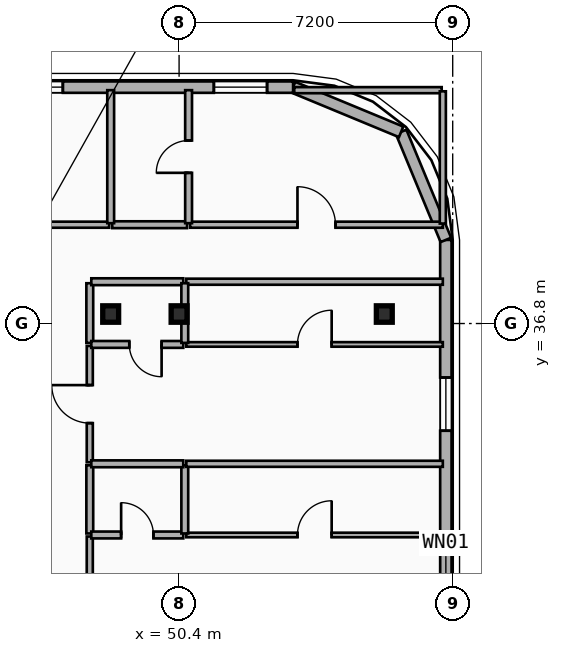
"""IFC4 building model, lengths in metres.
Left out: names, types, materials, properties, quantities, classifications, styles, units other than length and angle.
Written with IfcOpenShell. Run it as: python <this file> out.ifc"""

import sys

from ifc_helpers import new_model, si_unit, direction, frame, frame_2d, origin, origin_2d, place, context, subcontext, project, spatial, rectangle, i_section, extrude, element, fill, save


model = new_model("IFC4")
c1 = context("Model", 3, precision=1e-05, world=origin(), true_north=direction((0.0, 1.0)))
c2 = subcontext(c1, "Body", "Model", "MODEL_VIEW")
j1 = project(units=[si_unit("LENGTHUNIT", "METRE"), si_unit("PLANEANGLEUNIT", "RADIAN")], contexts=[c1])
p1 = place(None, origin())
s1 = spatial("IfcSite", under=j1, at=p1, CompositionType="ELEMENT")
p2 = place(p1, origin())
s2 = spatial("IfcBuilding", under=s1, at=p2, CompositionType="ELEMENT")
p3 = place(p2, frame((0.0, 0.0, 104.8)))
s3 = spatial("IfcBuildingStorey", under=s2, at=p3, CompositionType="ELEMENT", Elevation=104.8)
for number, where, z_axis, x_axis in (
    (1, (48.6, 37.05, 0.0), (0.0, 0.0, 1.0), (1.0, 0.0, 0.0)),
    (2, (50.4, 37.05, 0.0), (0.0, 0.0, 1.0), (1.0, 0.0, 0.0)),
    (3, (55.8, 37.05, 0.0), (0.0, 0.0, 1.0), (1.0, 0.0, 0.0)),
):
    element("IfcColumn", number, at=place(p3, frame(where, z_axis=z_axis, x_axis=x_axis)), inside=s3, PredefinedType="COLUMN", context=c2, shape_type="SweptSolid", body=[
        extrude(i_section(OverallWidth=0.418, OverallDepth=0.432, WebThickness=0.035, FlangeThickness=0.056, FilletRadius=0.015, at=origin_2d()), origin(), (0.0, 0.0, 1.0), 3.5),
    ])
p4 = place(p3, frame((57.42, 39.0, 0.0), z_axis=(0.0, 0.0, 1.0), x_axis=(0.0, -1.0, 0.0)))
e4 = element("IfcWall", 4, at=p4, inside=s3, PredefinedType="SOLIDWALL", context=c2, shape_type="SweptSolid", body=[
    extrude(rectangle(XDim=18.0, YDim=0.3, at=frame_2d((9.0, 0.0))), origin(), (0.0, 0.0, 1.0), 3.24),
])
p5 = place(p4, frame((8.882, 0.0, 0.48)))
e5 = element("IfcOpeningElement", 5, at=p5, cuts=e4, PredefinedType="OPENING", context=c2, shape_type="SweptSolid", body=[
    extrude(rectangle(XDim=1.4, YDim=1.8, at=frame_2d((0.7, 0.9))), frame((0.0, 0.16, 0.0), z_axis=(0.0, -1.0, 0.0), x_axis=(1.0, 0.0, 0.0)), (0.0, 0.0, 1.0), 0.32),
])
p6 = place(p4, frame((3.621, 0.0, 0.48)))
e6 = element("IfcOpeningElement", 6, at=p6, cuts=e4, PredefinedType="OPENING", context=c2, shape_type="SweptSolid", body=[
    extrude(rectangle(XDim=1.4, YDim=1.8, at=frame_2d((0.7, 0.9))), frame((0.0, 0.16, 0.0), z_axis=(0.0, -1.0, 0.0), x_axis=(1.0, 0.0, 0.0)), (0.0, 0.0, 1.0), 0.32),
])
p7 = place(p4, frame((14.655, 0.0, 0.48)))
e7 = element("IfcOpeningElement", 7, at=p7, cuts=e4, PredefinedType="OPENING", context=c2, shape_type="SweptSolid", body=[
    extrude(rectangle(XDim=1.4, YDim=1.8, at=frame_2d((0.7, 0.9))), frame((0.0, 0.16, 0.0), z_axis=(0.0, -1.0, 0.0), x_axis=(1.0, 0.0, 0.0)), (0.0, 0.0, 1.0), 0.32),
])
p8 = place(p3, frame((56.243, 41.843, 0.0), z_axis=(0.0, 0.0, 1.0), x_axis=(0.382636798336, -0.92389884758, 0.0)))
e8 = element("IfcWall", 8, at=p8, inside=s3, PredefinedType="SOLIDWALL", context=c2, shape_type="SweptSolid", body=[
    extrude(rectangle(XDim=3.077, YDim=0.3, at=frame_2d((1.538, 0.0))), origin(), (0.0, 0.0, 1.0), 3.24),
])
p9 = place(p3, frame((53.4, 43.02, 0.0), z_axis=(0.0, 0.0, 1.0), x_axis=(0.923882414032, -0.382676475685, 0.0)))
e9 = element("IfcWall", 9, at=p9, inside=s3, PredefinedType="SOLIDWALL", context=c2, shape_type="SweptSolid", body=[
    extrude(rectangle(XDim=3.077, YDim=0.3, at=frame_2d((1.539, 0.0))), origin(), (0.0, 0.0, 1.0), 3.24),
])
p10 = place(p3, frame((4.2, 43.02, 0.0), z_axis=(0.0, 0.0, 1.0), x_axis=(1.0, 0.0, 0.0)))
e10 = element("IfcWall", 10, at=p10, inside=s3, PredefinedType="SOLIDWALL", context=c2, shape_type="SweptSolid", body=[
    extrude(rectangle(XDim=49.2, YDim=0.3, at=frame_2d((24.6, 0.0))), origin(), (0.0, 0.0, 1.0), 3.24),
])
p11 = place(p10, frame((11.657, 0.0, 0.85)))
e11 = element("IfcOpeningElement", 11, at=p11, cuts=e10, PredefinedType="OPENING", context=c2, shape_type="SweptSolid", body=[
    extrude(rectangle(XDim=1.4, YDim=1.8, at=frame_2d((0.7, 0.9))), frame((0.0, 0.16, 0.0), z_axis=(0.0, -1.0, 0.0), x_axis=(1.0, 0.0, 0.0)), (0.0, 0.0, 1.0), 0.32),
])
p12 = place(p10, frame((20.053, 0.0, 0.85)))
e12 = element("IfcOpeningElement", 12, at=p12, cuts=e10, PredefinedType="OPENING", context=c2, shape_type="SweptSolid", body=[
    extrude(rectangle(XDim=1.4, YDim=1.8, at=frame_2d((0.7, 0.9))), frame((0.0, 0.16, 0.0), z_axis=(0.0, -1.0, 0.0), x_axis=(1.0, 0.0, 0.0)), (0.0, 0.0, 1.0), 0.32),
])
p13 = place(p10, frame((29.789, 0.0, 0.85)))
e13 = element("IfcOpeningElement", 13, at=p13, cuts=e10, PredefinedType="OPENING", context=c2, shape_type="SweptSolid", body=[
    extrude(rectangle(XDim=1.4, YDim=1.8, at=frame_2d((0.7, 0.9))), frame((0.0, 0.16, 0.0), z_axis=(0.0, -1.0, 0.0), x_axis=(1.0, 0.0, 0.0)), (0.0, 0.0, 1.0), 0.32),
])
p14 = place(p10, frame((31.928, 0.0, 0.85)))
e14 = element("IfcOpeningElement", 14, at=p14, cuts=e10, PredefinedType="OPENING", context=c2, shape_type="SweptSolid", body=[
    extrude(rectangle(XDim=1.4, YDim=1.8, at=frame_2d((0.7, 0.9))), frame((0.0, 0.16, 0.0), z_axis=(0.0, -1.0, 0.0), x_axis=(1.0, 0.0, 0.0)), (0.0, 0.0, 1.0), 0.32),
])
p15 = place(p10, frame((39.382, 0.0, 0.85)))
e15 = element("IfcOpeningElement", 15, at=p15, cuts=e10, PredefinedType="OPENING", context=c2, shape_type="SweptSolid", body=[
    extrude(rectangle(XDim=1.4, YDim=1.8, at=frame_2d((0.7, 0.9))), frame((0.0, 0.16, 0.0), z_axis=(0.0, -1.0, 0.0), x_axis=(1.0, 0.0, 0.0)), (0.0, 0.0, 1.0), 0.32),
])
p16 = place(p10, frame((41.741, 0.0, 0.85)))
e16 = element("IfcOpeningElement", 16, at=p16, cuts=e10, PredefinedType="OPENING", context=c2, shape_type="SweptSolid", body=[
    extrude(rectangle(XDim=1.4, YDim=1.8, at=frame_2d((0.7, 0.9))), frame((0.0, 0.16, 0.0), z_axis=(0.0, -1.0, 0.0), x_axis=(1.0, 0.0, 0.0)), (0.0, 0.0, 1.0), 0.32),
])
p17 = place(p10, frame((47.115, 0.0, 0.85)))
e17 = element("IfcOpeningElement", 17, at=p17, cuts=e10, PredefinedType="OPENING", context=c2, shape_type="SweptSolid", body=[
    extrude(rectangle(XDim=1.4, YDim=1.8, at=frame_2d((0.7, 0.9))), frame((0.0, 0.16, 0.0), z_axis=(0.0, -1.0, 0.0), x_axis=(1.0, 0.0, 0.0)), (0.0, 0.0, 1.0), 0.32),
])
p18 = place(p3, frame((48.05, 27.64, 0.0), z_axis=(0.0, 0.0, 1.0), x_axis=(0.0, 1.0, 0.0)))
e18 = element("IfcWall", 18, at=p18, inside=s3, PredefinedType="PARTITIONING", context=c2, shape_type="SweptSolid", body=[
    extrude(rectangle(XDim=3.556, YDim=0.16, at=frame_2d((1.778, 0.0))), origin(), (0.0, 0.0, 1.0), 3.24),
])
p19 = place(p18, frame((1.278, 0.0, 0.0)))
e19 = element("IfcOpeningElement", 19, at=p19, cuts=e18, PredefinedType="OPENING", context=c2, shape_type="SweptSolid", body=[
    extrude(rectangle(XDim=1.0, YDim=2.15, at=frame_2d((0.5, 1.075))), frame((0.0, 0.09, 0.0), z_axis=(0.0, -1.0, 0.0), x_axis=(1.0, 0.0, 0.0)), (0.0, 0.0, 1.0), 0.18),
])
p20 = place(p3, frame((48.05, 31.276, 0.0), z_axis=(0.0, 0.0, 1.0), x_axis=(0.0, 1.0, 0.0)))
e20 = element("IfcWall", 20, at=p20, inside=s3, PredefinedType="PLUMBINGWALL", context=c2, shape_type="SweptSolid", body=[
    extrude(rectangle(XDim=1.793, YDim=0.18, at=frame_2d((0.896, 0.0))), origin(), (0.0, 0.0, 1.0), 3.24),
])
p21 = place(p3, frame((48.05, 33.149, 0.0), z_axis=(0.0, 0.0, 1.0), x_axis=(0.0, 1.0, 0.0)))
e21 = element("IfcWall", 21, at=p21, inside=s3, PredefinedType="PARTITIONING", context=c2, shape_type="SweptSolid", body=[
    extrude(rectangle(XDim=3.061, YDim=0.16, at=frame_2d((1.531, 0.0))), origin(), (0.0, 0.0, 1.0), 3.24),
])
p22 = place(p21, frame((1.031, 0.0, 0.0)))
e22 = element("IfcOpeningElement", 22, at=p22, cuts=e21, PredefinedType="OPENING", context=c2, shape_type="SweptSolid", body=[
    extrude(rectangle(XDim=1.0, YDim=2.15, at=frame_2d((0.5, 1.075))), frame((0.0, 0.09, 0.0), z_axis=(0.0, -1.0, 0.0), x_axis=(1.0, 0.0, 0.0)), (0.0, 0.0, 1.0), 0.18),
])
p23 = place(p3, frame((48.05, 36.29, 0.0), z_axis=(0.0, 0.0, 1.0), x_axis=(0.0, 1.0, 0.0)))
e23 = element("IfcWall", 23, at=p23, inside=s3, PredefinedType="PLUMBINGWALL", context=c2, shape_type="SweptSolid", body=[
    extrude(rectangle(XDim=1.57, YDim=0.18, at=frame_2d((0.785, 0.0))), origin(), (0.0, 0.0, 1.0), 2.72),
])
p24 = place(p3, frame((48.09, 37.9, 0.0), z_axis=(0.0, 0.0, 1.0), x_axis=(1.0, 0.0, 0.0)))
e24 = element("IfcWall", 24, at=p24, inside=s3, PredefinedType="PLUMBINGWALL", context=c2, shape_type="SweptSolid", body=[
    extrude(rectangle(XDim=2.42, YDim=0.18, at=frame_2d((1.21, 0.0))), origin(), (0.0, 0.0, 1.0), 3.24),
])
p25 = place(p3, frame((50.59, 37.9, 0.0), z_axis=(0.0, 0.0, 1.0), x_axis=(1.0, 0.0, 0.0)))
e25 = element("IfcWall", 25, at=p25, inside=s3, PredefinedType="PARTITIONING", context=c2, shape_type="SweptSolid", body=[
    extrude(rectangle(XDim=6.75, YDim=0.16, at=frame_2d((3.375, 0.0))), origin(), (0.0, 0.0, 1.0), 3.24),
])
p26 = place(p3, frame((42.363, 39.4, 0.0), z_axis=(0.0, 0.0, 1.0), x_axis=(1.0, 0.0, 0.0)))
e26 = element("IfcWall", 26, at=p26, inside=s3, PredefinedType="PARTITIONING", context=c2, shape_type="SweptSolid", body=[
    extrude(rectangle(XDim=6.197, YDim=0.16, at=frame_2d((3.099, 0.0))), origin(), (0.0, 0.0, 1.0), 3.24),
])
p27 = place(p26, frame((2.598, 0.0, 0.0)))
e27 = element("IfcOpeningElement", 27, at=p27, cuts=e26, PredefinedType="OPENING", context=c2, shape_type="SweptSolid", body=[
    extrude(rectangle(XDim=1.0, YDim=2.15, at=frame_2d((0.5, 1.075))), frame((0.0, 0.09, 0.0), z_axis=(0.0, -1.0, 0.0), x_axis=(1.0, 0.0, 0.0)), (0.0, 0.0, 1.0), 0.18),
])
p28 = place(p3, frame((50.69, 39.4, 0.0), z_axis=(0.0, 0.0, 1.0), x_axis=(1.0, 0.0, 0.0)))
e28 = element("IfcWall", 28, at=p28, inside=s3, PredefinedType="PARTITIONING", context=c2, shape_type="SweptSolid", body=[
    extrude(rectangle(XDim=6.65, YDim=0.16, at=frame_2d((3.325, 0.0))), origin(), (0.0, 0.0, 1.0), 3.24),
])
p29 = place(p28, frame((2.825, 0.0, 0.0)))
e29 = element("IfcOpeningElement", 29, at=p29, cuts=e28, PredefinedType="OPENING", context=c2, shape_type="SweptSolid", body=[
    extrude(rectangle(XDim=1.0, YDim=2.15, at=frame_2d((0.5, 1.075))), frame((0.0, 0.09, 0.0), z_axis=(0.0, -1.0, 0.0), x_axis=(1.0, 0.0, 0.0)), (0.0, 0.0, 1.0), 0.18),
])
p30 = place(p3, frame((48.64, 39.4, 0.0), z_axis=(0.0, 0.0, 1.0), x_axis=(1.0, 0.0, 0.0)))
e30 = element("IfcWall", 30, at=p30, inside=s3, PredefinedType="PLUMBINGWALL", context=c2, shape_type="SweptSolid", body=[
    extrude(rectangle(XDim=1.97, YDim=0.18, at=frame_2d((0.985, 0.0))), origin(), (0.0, 0.0, 1.0), 3.24),
])
p31 = place(p3, frame((48.09, 31.236, 0.0), z_axis=(0.0, 0.0, 1.0), x_axis=(1.0, 0.0, 0.0)))
e31 = element("IfcWall", 31, at=p31, inside=s3, PredefinedType="PLUMBINGWALL", context=c2, shape_type="SweptSolid", body=[
    extrude(rectangle(XDim=2.42, YDim=0.18, at=frame_2d((1.21, 0.0))), origin(), (0.0, 0.0, 1.0), 2.57),
])
p32 = place(p31, frame((0.785, 0.0, 0.0)))
e32 = element("IfcOpeningElement", 32, at=p32, cuts=e31, PredefinedType="OPENING", context=c2, shape_type="SweptSolid", body=[
    extrude(rectangle(XDim=0.85, YDim=2.1, at=frame_2d((0.425, 1.05))), frame((0.0, 0.1, 0.0), z_axis=(0.0, -1.0, 0.0), x_axis=(1.0, 0.0, 0.0)), (0.0, 0.0, 1.0), 0.2),
])
p33 = place(p3, frame((50.59, 31.236, 0.0), z_axis=(0.0, 0.0, 1.0), x_axis=(1.0, 0.0, 0.0)))
e33 = element("IfcWall", 33, at=p33, inside=s3, PredefinedType="PARTITIONING", context=c2, shape_type="SweptSolid", body=[
    extrude(rectangle(XDim=6.75, YDim=0.12, at=frame_2d((3.375, 0.0))), origin(), (0.0, 0.0, 1.0), 2.57),
])
p34 = place(p33, frame((2.925, 0.0, 0.0)))
e34 = element("IfcOpeningElement", 34, at=p34, cuts=e33, PredefinedType="OPENING", context=c2, shape_type="SweptSolid", body=[
    extrude(rectangle(XDim=0.9, YDim=2.1, at=frame_2d((0.45, 1.05))), frame((0.0, 0.07, 0.0), z_axis=(0.0, -1.0, 0.0), x_axis=(1.0, 0.0, 0.0)), (0.0, 0.0, 1.0), 0.14),
])
p35 = place(p3, frame((50.55, 31.276, 0.0), z_axis=(0.0, 0.0, 1.0), x_axis=(0.0, 1.0, 0.0)))
e35 = element("IfcWall", 35, at=p35, inside=s3, PredefinedType="PLUMBINGWALL", context=c2, shape_type="SweptSolid", body=[
    extrude(rectangle(XDim=1.793, YDim=0.18, at=frame_2d((0.896, 0.0))), origin(), (0.0, 0.0, 1.0), 2.57),
])
p36 = place(p3, frame((48.09, 33.109, 0.0), z_axis=(0.0, 0.0, 1.0), x_axis=(1.0, 0.0, 0.0)))
e36 = element("IfcWall", 36, at=p36, inside=s3, PredefinedType="PLUMBINGWALL", context=c2, shape_type="SweptSolid", body=[
    extrude(rectangle(XDim=2.42, YDim=0.18, at=frame_2d((1.21, 0.0))), origin(), (0.0, 0.0, 1.0), 2.57),
])
p37 = place(p3, frame((50.59, 33.109, 0.0), z_axis=(0.0, 0.0, 1.0), x_axis=(1.0, 0.0, 0.0)))
e37 = element("IfcWall", 37, at=p37, inside=s3, PredefinedType="PARTITIONING", context=c2, shape_type="SweptSolid", body=[
    extrude(rectangle(XDim=6.75, YDim=0.16, at=frame_2d((3.375, 0.0))), origin(), (0.0, 0.0, 1.0), 2.57),
])
p38 = place(p3, frame((50.51, 36.25, 0.0), z_axis=(0.0, 0.0, 1.0), x_axis=(-1.0, 0.0, 0.0)))
e38 = element("IfcWall", 38, at=p38, inside=s3, PredefinedType="PLUMBINGWALL", context=c2, shape_type="SweptSolid", body=[
    extrude(rectangle(XDim=2.42, YDim=0.18, at=frame_2d((1.21, 0.0))), origin(), (0.0, 0.0, 1.0), 2.57),
])
p39 = place(p38, frame((0.57, 0.0, 0.0)))
e39 = element("IfcOpeningElement", 39, at=p39, cuts=e38, PredefinedType="OPENING", context=c2, shape_type="SweptSolid", body=[
    extrude(rectangle(XDim=0.85, YDim=2.1, at=frame_2d((0.425, 1.05))), frame((0.0, 0.1, 0.0), z_axis=(0.0, -1.0, 0.0), x_axis=(1.0, 0.0, 0.0)), (0.0, 0.0, 1.0), 0.2),
])
p40 = place(p3, frame((50.59, 36.25, 0.0), z_axis=(0.0, 0.0, 1.0), x_axis=(1.0, 0.0, 0.0)))
e40 = element("IfcWall", 40, at=p40, inside=s3, PredefinedType="PARTITIONING", context=c2, shape_type="SweptSolid", body=[
    extrude(rectangle(XDim=6.75, YDim=0.12, at=frame_2d((3.375, 0.0))), origin(), (0.0, 0.0, 1.0), 2.57),
])
p41 = place(p40, frame((2.925, 0.0, 0.0)))
e41 = element("IfcOpeningElement", 41, at=p41, cuts=e40, PredefinedType="OPENING", context=c2, shape_type="SweptSolid", body=[
    extrude(rectangle(XDim=0.9, YDim=2.1, at=frame_2d((0.45, 1.05))), frame((0.0, 0.07, 0.0), z_axis=(0.0, -1.0, 0.0), x_axis=(1.0, 0.0, 0.0)), (0.0, 0.0, 1.0), 0.14),
])
p42 = place(p3, frame((50.55, 36.29, 0.0), z_axis=(0.0, 0.0, 1.0), x_axis=(0.0, 1.0, 0.0)))
e42 = element("IfcWall", 42, at=p42, inside=s3, PredefinedType="PLUMBINGWALL", context=c2, shape_type="SweptSolid", body=[
    extrude(rectangle(XDim=1.57, YDim=0.18, at=frame_2d((0.785, 0.0))), origin(), (0.0, 0.0, 1.0), 2.57),
])
p43 = place(p3, frame((48.6, 39.44, 0.0), z_axis=(0.0, 0.0, 1.0), x_axis=(0.0, 1.0, 0.0)))
e43 = element("IfcWall", 43, at=p43, inside=s3, PredefinedType="PLUMBINGWALL", context=c2, shape_type="SweptSolid", body=[
    extrude(rectangle(XDim=3.5, YDim=0.18, at=frame_2d((1.75, 0.0))), origin(), (0.0, 0.0, 1.0), 3.24),
])
p44 = place(p3, frame((50.65, 39.44, 0.0), z_axis=(0.0, 0.0, 1.0), x_axis=(0.0, 1.0, 0.0)))
e44 = element("IfcWall", 44, at=p44, inside=s3, PredefinedType="PLUMBINGWALL", context=c2, shape_type="SweptSolid", body=[
    extrude(rectangle(XDim=3.5, YDim=0.18, at=frame_2d((1.75, 0.0))), origin(), (0.0, 0.0, 1.0), 3.24),
])
p45 = place(p44, frame((1.325, 0.0, 0.0)))
e45 = element("IfcOpeningElement", 45, at=p45, cuts=e44, PredefinedType="OPENING", context=c2, shape_type="SweptSolid", body=[
    extrude(rectangle(XDim=0.85, YDim=2.1, at=frame_2d((0.425, 1.05))), frame((0.0, 0.1, 0.0), z_axis=(0.0, -1.0, 0.0), x_axis=(1.0, 0.0, 0.0)), (0.0, 0.0, 1.0), 0.2),
])
p46 = place(p3, frame((53.43, 42.94, 0.0), z_axis=(0.0, 0.0, 1.0), x_axis=(1.0, 0.0, 0.0)))
e46 = element("IfcWall", 46, at=p46, inside=s3, PredefinedType="PARTITIONING", context=c2, shape_type="SweptSolid", body=[
    extrude(rectangle(XDim=3.88, YDim=0.16, at=frame_2d((1.94, 0.0))), origin(), (0.0, 0.0, 1.0), 3.24),
])
p47 = place(p3, frame((57.34, 39.43, 0.0), z_axis=(0.0, 0.0, 1.0), x_axis=(0.0, 1.0, 0.0)))
e47 = element("IfcWall", 47, at=p47, inside=s3, PredefinedType="PARTITIONING", context=c2, shape_type="SweptSolid", body=[
    extrude(rectangle(XDim=3.48, YDim=0.16, at=frame_2d((1.74, 0.0))), origin(), (0.0, 0.0, 1.0), 3.24),
])
p48 = place(p6, origin())
e48 = element("IfcWindow", 48, at=p48, inside=s3, PartitioningType="SINGLE_PANEL", PredefinedType="WINDOW", context=c2, shape_type="SweptSolid", body=[
    extrude(rectangle(XDim=1.4, YDim=1.8, at=frame_2d((0.7, 0.9))), frame((0.0, 0.03, 0.0), z_axis=(0.0, -1.0, 0.0), x_axis=(1.0, 0.0, 0.0)), (0.0, 0.0, 1.0), 0.06),
])
fill(e6, e48)
p49 = place(p16, origin())
e49 = element("IfcWindow", 49, at=p49, inside=s3, PartitioningType="SINGLE_PANEL", PredefinedType="WINDOW", context=c2, shape_type="SweptSolid", body=[
    extrude(rectangle(XDim=1.4, YDim=1.8, at=frame_2d((0.7, 0.9))), frame((0.0, 0.03, 0.0), z_axis=(0.0, -1.0, 0.0), x_axis=(1.0, 0.0, 0.0)), (0.0, 0.0, 1.0), 0.06),
])
fill(e16, e49)
p50 = place(p17, origin())
e50 = element("IfcWindow", 50, at=p50, inside=s3, PartitioningType="SINGLE_PANEL", PredefinedType="WINDOW", context=c2, shape_type="SweptSolid", body=[
    extrude(rectangle(XDim=1.4, YDim=1.8, at=frame_2d((0.7, 0.9))), frame((0.0, 0.03, 0.0), z_axis=(0.0, -1.0, 0.0), x_axis=(1.0, 0.0, 0.0)), (0.0, 0.0, 1.0), 0.06),
])
fill(e17, e50)
p51 = place(p22, origin())
e51 = element("IfcDoor", 51, at=p51, inside=s3, OperationType="SINGLE_SWING_RIGHT", PredefinedType="DOOR", context=c2, shape_type="SweptSolid", body=[
    extrude(rectangle(XDim=1.0, YDim=2.15, at=frame_2d((0.5, 1.075))), frame((0.0, 0.025, 0.0), z_axis=(0.0, -1.0, 0.0), x_axis=(1.0, 0.0, 0.0)), (0.0, 0.0, 1.0), 0.05),
])
fill(e22, e51)
p52 = place(p29, origin())
e52 = element("IfcDoor", 52, at=p52, inside=s3, OperationType="SINGLE_SWING_LEFT", PredefinedType="DOOR", context=c2, shape_type="SweptSolid", body=[
    extrude(rectangle(XDim=1.0, YDim=2.15, at=frame_2d((0.5, 1.075))), frame((0.0, 0.025, 0.0), z_axis=(0.0, -1.0, 0.0), x_axis=(1.0, 0.0, 0.0)), (0.0, 0.0, 1.0), 0.05),
])
fill(e29, e52)
p53 = place(p32, origin())
e53 = element("IfcDoor", 53, at=p53, inside=s3, OperationType="SINGLE_SWING_LEFT", PredefinedType="DOOR", context=c2, shape_type="SweptSolid", body=[
    extrude(rectangle(XDim=0.85, YDim=2.1, at=frame_2d((0.425, 1.05))), frame((0.0, 0.025, 0.0), z_axis=(0.0, -1.0, 0.0), x_axis=(1.0, 0.0, 0.0)), (0.0, 0.0, 1.0), 0.05),
])
fill(e32, e53)
p54 = place(p34, origin())
e54 = element("IfcDoor", 54, at=p54, inside=s3, OperationType="SINGLE_SWING_RIGHT", PredefinedType="DOOR", context=c2, shape_type="SweptSolid", body=[
    extrude(rectangle(XDim=0.9, YDim=2.1, at=frame_2d((0.45, 1.05))), frame((0.0, 0.025, 0.0), z_axis=(0.0, -1.0, 0.0), x_axis=(1.0, 0.0, 0.0)), (0.0, 0.0, 1.0), 0.05),
])
fill(e34, e54)
p55 = place(p39, origin())
e55 = element("IfcDoor", 55, at=p55, inside=s3, OperationType="SINGLE_SWING_LEFT", PredefinedType="DOOR", context=c2, shape_type="SweptSolid", body=[
    extrude(rectangle(XDim=0.85, YDim=2.1, at=frame_2d((0.425, 1.05))), frame((0.0, 0.025, 0.0), z_axis=(0.0, -1.0, 0.0), x_axis=(1.0, 0.0, 0.0)), (0.0, 0.0, 1.0), 0.05),
])
fill(e39, e55)
p56 = place(p41, origin())
e56 = element("IfcDoor", 56, at=p56, inside=s3, OperationType="SINGLE_SWING_RIGHT", PredefinedType="DOOR", context=c2, shape_type="SweptSolid", body=[
    extrude(rectangle(XDim=0.9, YDim=2.1, at=frame_2d((0.45, 1.05))), frame((0.0, 0.025, 0.0), z_axis=(0.0, -1.0, 0.0), x_axis=(1.0, 0.0, 0.0)), (0.0, 0.0, 1.0), 0.05),
])
fill(e41, e56)
p57 = place(p45, origin())
e57 = element("IfcDoor", 57, at=p57, inside=s3, OperationType="SINGLE_SWING_LEFT", PredefinedType="DOOR", context=c2, shape_type="SweptSolid", body=[
    extrude(rectangle(XDim=0.85, YDim=2.1, at=frame_2d((0.425, 1.05))), frame((0.0, 0.025, 0.0), z_axis=(0.0, -1.0, 0.0), x_axis=(1.0, 0.0, 0.0)), (0.0, 0.0, 1.0), 0.05),
])
fill(e45, e57)
save(model, sys.argv[1])
